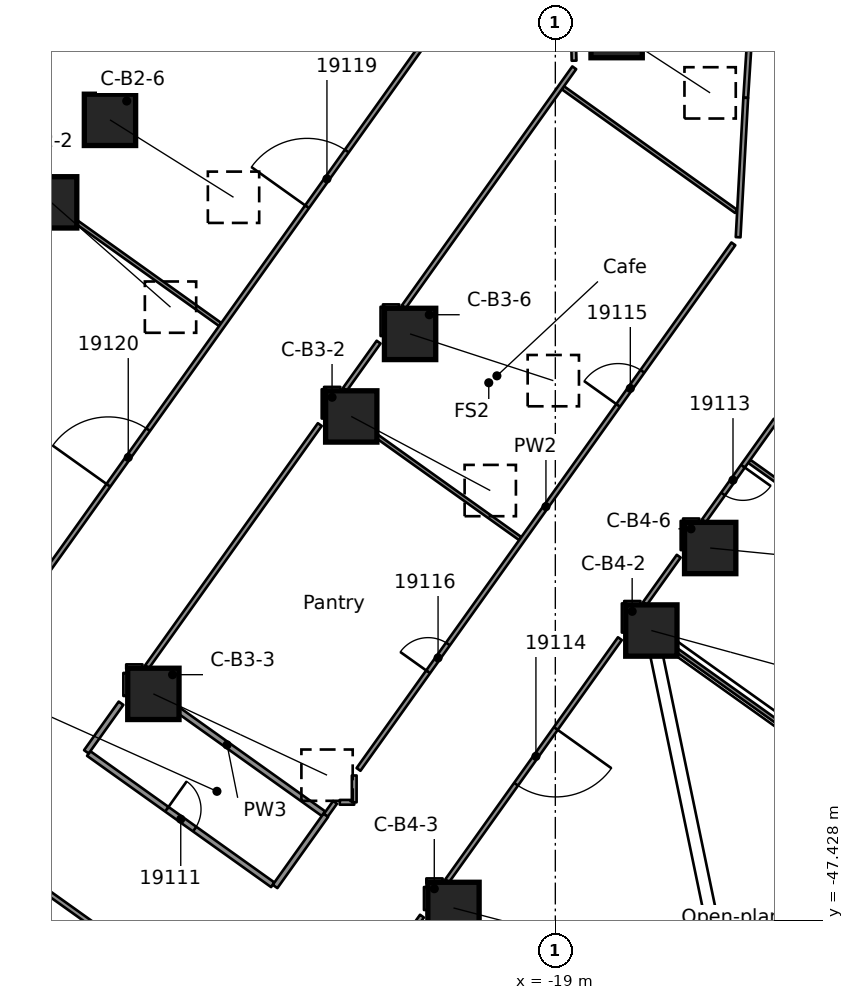
"""IFC4 building model, lengths in metres.
Left out: names, types, materials, properties, quantities, classifications, styles, units other than length and angle.
Written with IfcOpenShell. Run it as: python <this file> out.ifc"""

import sys

from ifc_helpers import new_model, si_unit, direction, frame, frame_2d, origin, origin_2d, place, context, subcontext, project, spatial, rectangle, extrude, element, fill, save


model = new_model("IFC4")
c1 = context("Model", 3, precision=1e-05, world=origin(), true_north=direction((0.0, 1.0)))
c2 = subcontext(c1, "Body", "Model", "MODEL_VIEW")
j1 = project(units=[si_unit("LENGTHUNIT", "METRE"), si_unit("PLANEANGLEUNIT", "RADIAN")], contexts=[c1])
p1 = place(None, origin())
s1 = spatial("IfcSite", under=j1, at=p1, CompositionType="ELEMENT")
p2 = place(p1, origin())
s2 = spatial("IfcBuilding", under=s1, at=p2, CompositionType="ELEMENT")
p3 = place(p2, frame((0.0, 0.0, 98.2)))
s3 = spatial("IfcBuildingStorey", under=s2, at=p3, CompositionType="ELEMENT", Elevation=98.2)
p4 = place(p3, frame((-32.267, -28.533, 0.555), z_axis=(0.618188651788, -0.542608770763, 0.568698964912), x_axis=(0.659670030756, 0.751555354264, 0.0)))
e1 = element("IfcColumn", 1, at=p4, inside=s3, PredefinedType="COLUMN", context=c2, shape_type="SweptSolid", body=[
    extrude(rectangle(XDim=1.35, YDim=1.35, at=origin_2d()), origin(), (0.0, 0.0, 1.0), 5.081),
])
p5 = place(p3, frame((-30.719, -26.362, 0.537), z_axis=(0.673755446544, -0.422134401511, 0.606511455221), x_axis=(0.530936748584, 0.847411452013, 0.0)))
e2 = element("IfcColumn", 2, at=p5, inside=s3, PredefinedType="COLUMN", context=c2, shape_type="SweptSolid", body=[
    extrude(rectangle(XDim=1.35, YDim=1.35, at=origin_2d()), origin(), (0.0, 0.0, 1.0), 4.825),
])
p6 = place(p3, frame((-24.37, -34.166, 0.553), z_axis=(0.723657942308, -0.38573518321, 0.572300228), x_axis=(0.470383419511, 0.882462145731, 0.0)))
e3 = element("IfcColumn", 3, at=p6, inside=s3, PredefinedType="COLUMN", context=c2, shape_type="SweptSolid", body=[
    extrude(rectangle(XDim=1.35, YDim=1.35, at=origin_2d()), origin(), (0.0, 0.0, 1.0), 5.055),
])
p7 = place(p3, frame((-29.577, -41.466, 0.589), z_axis=(0.790481731796, -0.369986668034, 0.488107055033), x_axis=(0.423915616094, 0.905701689538, 0.0)))
e4 = element("IfcColumn", 4, at=p7, inside=s3, PredefinedType="COLUMN", context=c2, shape_type="SweptSolid", body=[
    extrude(rectangle(XDim=1.35, YDim=1.35, at=origin_2d()), origin(), (0.0, 0.0, 1.0), 5.781),
])
p8 = place(p3, frame((-22.822, -31.995, 0.544), z_axis=(0.76622208447, -0.249848553778, 0.592013021347), x_axis=(0.310013339183, 0.950732207053, 0.0)))
e5 = element("IfcColumn", 5, at=p8, inside=s3, PredefinedType="COLUMN", context=c2, shape_type="SweptSolid", body=[
    extrude(rectangle(XDim=1.35, YDim=1.35, at=origin_2d()), origin(), (0.0, 0.0, 1.0), 4.919),
])
p9 = place(p3, frame((-16.473, -39.799, 0.562), z_axis=(0.803489718201, -0.21971009191, 0.553291738831), x_axis=(0.263761556788, 0.964587912614, 0.0)))
e6 = element("IfcColumn", 6, at=p9, inside=s3, PredefinedType="COLUMN", context=c2, shape_type="SweptSolid", body=[
    extrude(rectangle(XDim=1.35, YDim=1.35, at=origin_2d()), origin(), (0.0, 0.0, 1.0), 5.197),
])
p10 = place(p3, frame((-21.68, -47.098, 0.595), z_axis=(0.853278071018, -0.223555579067, 0.471104485851), x_axis=(0.253442130639, 0.967350549913, 0.0)))
e7 = element("IfcColumn", 7, at=p10, inside=s3, PredefinedType="COLUMN", context=c2, shape_type="SweptSolid", body=[
    extrude(rectangle(XDim=1.35, YDim=1.35, at=origin_2d()), origin(), (0.0, 0.0, 1.0), 5.963),
])
p11 = place(p3, frame((-14.925, -37.628, 0.561), z_axis=(0.827494463111, -0.081495666822, 0.555528009924), x_axis=(0.098010679686, 0.995185362969, 0.0)))
e8 = element("IfcColumn", 8, at=p11, inside=s3, PredefinedType="COLUMN", context=c2, shape_type="SweptSolid", body=[
    extrude(rectangle(XDim=1.35, YDim=1.35, at=origin_2d()), origin(), (0.0, 0.0, 1.0), 5.18),
])
p12 = place(p3, frame((-17.387, -24.053, 0.467), z_axis=(0.57958595143, -0.376765381289, 0.722584232023), x_axis=(0.54502344735, 0.838420802366, 0.0)))
e9 = element("IfcColumn", 9, at=p12, inside=s3, PredefinedType="COLUMN", context=c2, shape_type="SweptSolid", body=[
    extrude(rectangle(XDim=1.35, YDim=1.35, at=origin_2d()), origin(), (0.0, 0.0, 1.0), 4.244),
])
p13 = place(p3, frame((-18.681, -18.114, 0.0), z_axis=(0.0, 0.0, 1.0), x_axis=(0.025970949463, -0.999662698006, 0.0)))
e10 = element("IfcWall", 10, at=p13, inside=s3, PredefinedType="PARTITIONING", context=c2, shape_type="SweptSolid", body=[
    extrude(rectangle(XDim=6.693, YDim=0.125, at=frame_2d((3.347, 0.0))), origin(), (0.0, 0.0, 1.0), 3.58),
])
p14 = place(p3, frame((-25.586, -51.52, 0.0), z_axis=(0.0, 0.0, 1.0), x_axis=(-0.814070118749, 0.580766598351, 0.0)))
e11 = element("IfcWall", 11, at=p14, inside=s3, PredefinedType="PARTITIONING", context=c2, shape_type="SweptSolid", body=[
    extrude(rectangle(XDim=13.176, YDim=0.125, at=frame_2d((6.588, 0.0))), origin(), (0.0, 0.0, 1.0), 3.58),
])
p15 = place(p14, frame((8.938, 0.0, 0.0)))
e12 = element("IfcOpeningElement", 12, at=p15, cuts=e11, PredefinedType="OPENING", context=c2, shape_type="SweptSolid", body=[
    extrude(rectangle(XDim=1.8, YDim=2.1, at=frame_2d((0.9, 1.05))), frame((0.0, 0.073, 0.0), z_axis=(0.0, -1.0, 0.0), x_axis=(1.0, 0.0, 0.0)), (0.0, 0.0, 1.0), 0.145),
])
p16 = place(p3, frame((-31.279, -43.035, 0.0), z_axis=(0.0, 0.0, 1.0), x_axis=(0.814146456828, -0.58065957913, 0.0)))
e13 = element("IfcWall", 13, at=p16, inside=s3, PredefinedType="PARTITIONING", context=c2, shape_type="SweptSolid", body=[
    extrude(rectangle(XDim=5.948, YDim=0.15, at=frame_2d((2.974, 0.0))), origin(), (0.0, 0.0, 1.0), 3.58),
])
p17 = place(p16, frame((2.525, 0.0, 0.0)))
e14 = element("IfcOpeningElement", 14, at=p17, cuts=e13, PredefinedType="OPENING", context=c2, shape_type="SweptSolid", body=[
    extrude(rectangle(XDim=0.9, YDim=2.1, at=frame_2d((0.45, 1.05))), frame((0.0, 0.085, 0.0), z_axis=(0.0, -1.0, 0.0), x_axis=(1.0, 0.0, 0.0)), (0.0, 0.0, 1.0), 0.17),
])
p18 = place(p3, frame((-30.173, -41.0, 0.0), z_axis=(0.0, 0.0, 1.0), x_axis=(0.81418338872, -0.580607793207, 0.0)))
e15 = element("IfcWall", 15, at=p18, inside=s3, PredefinedType="PARTITIONING", context=c2, shape_type="SweptSolid", body=[
    extrude(rectangle(XDim=6.229, YDim=0.15, at=frame_2d((3.115, 0.0))), origin(), (0.0, 0.0, 1.0), 3.58),
])
p19 = place(p3, frame((-22.302, -46.613, 0.0), z_axis=(0.0, 0.0, 1.0), x_axis=(0.814113642146, -0.580705586052, 0.0)))
e16 = element("IfcWall", 16, at=p19, inside=s3, PredefinedType="PARTITIONING", context=c2, shape_type="SweptSolid", body=[
    extrude(rectangle(XDim=15.874, YDim=0.1, at=frame_2d((7.937, 0.0))), origin(), (0.0, 0.0, 1.0), 3.58),
])
p20 = place(p3, frame((-40.875, -22.433, 0.0), z_axis=(0.0, 0.0, 1.0), x_axis=(0.814077901833, -0.580755688519, 0.0)))
e17 = element("IfcWall", 17, at=p20, inside=s3, PredefinedType="PARTITIONING", context=c2, shape_type="SweptSolid", body=[
    extrude(rectangle(XDim=16.038, YDim=0.1, at=frame_2d((8.019, 0.0))), origin(), (0.0, 0.0, 1.0), 3.58),
])
p21 = place(p3, frame((-24.993, -33.762, 0.0), z_axis=(0.0, 0.0, 1.0), x_axis=(0.813990298992, -0.580878466761, 0.0)))
e18 = element("IfcWall", 18, at=p21, inside=s3, PredefinedType="PARTITIONING", context=c2, shape_type="SweptSolid", body=[
    extrude(rectangle(XDim=6.228, YDim=0.1, at=frame_2d((3.114, 0.0))), origin(), (0.0, 0.0, 1.0), 3.58),
])
p22 = place(p3, frame((-17.095, -39.395, 0.0), z_axis=(0.0, 0.0, 1.0), x_axis=(0.814054615278, -0.580788329209, 0.0)))
e19 = element("IfcWall", 19, at=p22, inside=s3, PredefinedType="PARTITIONING", context=c2, shape_type="SweptSolid", body=[
    extrude(rectangle(XDim=15.558, YDim=0.1, at=frame_2d((7.779, 0.0))), origin(), (0.0, 0.0, 1.0), 3.58),
])
p23 = place(p3, frame((-13.896, -35.347, 0.0), z_axis=(0.0, 0.0, 1.0), x_axis=(0.814118018686, -0.580699450362, 0.0)))
e20 = element("IfcWall", 20, at=p23, inside=s3, PredefinedType="PARTITIONING", context=c2, shape_type="SweptSolid", body=[
    extrude(rectangle(XDim=14.793, YDim=0.1, at=frame_2d((7.396, 0.0))), origin(), (0.0, 0.0, 1.0), 3.58),
])
p24 = place(p3, frame((-18.801, -25.518, 0.0), z_axis=(0.0, 0.0, 1.0), x_axis=(0.814033792671, -0.580817513845, 0.0)))
e21 = element("IfcWall", 21, at=p24, inside=s3, PredefinedType="PARTITIONING", context=c2, shape_type="SweptSolid", body=[
    extrude(rectangle(XDim=5.601, YDim=0.1, at=frame_2d((2.8, 0.0))), origin(), (0.0, 0.0, 1.0), 3.58),
])
p25 = place(p3, frame((-22.394, -46.384, 0.0), z_axis=(0.0, 0.0, 1.0), x_axis=(1.0, 0.0, 0.0)))
e22 = element("IfcWall", 22, at=p25, inside=s3, PredefinedType="PARTITIONING", context=c2, shape_type="SweptSolid", body=[
    extrude(rectangle(XDim=0.428, YDim=0.125, at=frame_2d((0.214, 0.0))), origin(), (0.0, 0.0, 1.0), 3.58),
])
p26 = place(p3, frame((-24.674, -44.319, 0.0), z_axis=(0.0, 0.0, 1.0), x_axis=(1.0, 0.0, 0.0)))
e23 = element("IfcWall", 23, at=p26, inside=s3, PredefinedType="PARTITIONING", context=c2, shape_type="SweptSolid", body=[
    extrude(rectangle(XDim=0.382, YDim=0.125, at=frame_2d((0.191, 0.0))), origin(), (0.0, 0.0, 1.0), 3.58),
])
p27 = place(p3, frame((-30.292, -40.752, 0.0), z_axis=(0.0, 0.0, 1.0), x_axis=(1.0, 0.0, 0.0)))
e24 = element("IfcWall", 24, at=p27, inside=s3, PredefinedType="PARTITIONING", context=c2, shape_type="SweptSolid", body=[
    extrude(rectangle(XDim=0.428, YDim=0.125, at=frame_2d((0.214, 0.0))), origin(), (0.0, 0.0, 1.0), 3.58),
])
for number, where, z_axis, x_axis in (
    (25, (-17.187, -39.085, 0.0), (0.0, 0.0, 1.0), (1.0, 0.0, 0.0)),
    (26, (-15.639, -36.914, 0.0), (0.0, 0.0, 1.0), (1.0, 0.0, 0.0)),
):
    element("IfcWall", number, at=place(p3, frame(where, z_axis=z_axis, x_axis=x_axis)), inside=s3, PredefinedType="PARTITIONING", context=c2, shape_type="SweptSolid", body=[
        extrude(rectangle(XDim=0.427, YDim=0.125, at=frame_2d((0.213, 0.0))), origin(), (0.0, 0.0, 1.0), 3.58),
    ])
for number, where, z_axis, x_axis in (
    (27, (-25.085, -33.451, 0.0), (0.0, 0.0, 1.0), (1.0, 0.0, 0.0)),
    (28, (-23.536, -31.28, 0.0), (0.0, 0.0, 1.0), (1.0, 0.0, 0.0)),
):
    element("IfcWall", number, at=place(p3, frame(where, z_axis=z_axis, x_axis=x_axis)), inside=s3, PredefinedType="PARTITIONING", context=c2, shape_type="SweptSolid", body=[
        extrude(rectangle(XDim=0.428, YDim=0.125, at=frame_2d((0.214, 0.0))), origin(), (0.0, 0.0, 1.0), 3.58),
    ])
p28 = place(p3, frame((-25.04, -44.661, 0.0), z_axis=(0.0, 0.0, 1.0), x_axis=(0.582339384151, 0.812945780275, 0.0)))
e29 = element("IfcWall", 29, at=p28, inside=s3, PredefinedType="PARTITIONING", context=c2, shape_type="SweptSolid", body=[
    extrude(rectangle(XDim=0.419, YDim=0.125, at=frame_2d((0.209, 0.0))), origin(), (0.0, 0.0, 1.0), 3.58),
])
p29 = place(p3, frame((-22.509, -47.314, 0.0), z_axis=(0.0, 0.0, 1.0), x_axis=(-0.580683886647, -0.81412911985, 0.0)))
e30 = element("IfcWall", 30, at=p29, inside=s3, PredefinedType="PARTITIONING", context=c2, shape_type="SweptSolid", body=[
    extrude(rectangle(XDim=5.209, YDim=0.125, at=frame_2d((2.604, 0.0))), origin(), (0.0, 0.0, 1.0), 3.58),
])
p30 = place(p29, frame((2.46, 0.0, 0.0)))
e31 = element("IfcOpeningElement", 31, at=p30, cuts=e30, PredefinedType="OPENING", context=c2, shape_type="SweptSolid", body=[
    extrude(rectangle(XDim=1.8, YDim=2.1, at=frame_2d((0.9, 1.05))), frame((0.0, 0.073, 0.0), z_axis=(0.0, -1.0, 0.0), x_axis=(1.0, 0.0, 0.0)), (0.0, 0.0, 1.0), 0.145),
])
p31 = place(p3, frame((-17.301, -40.013, 0.0), z_axis=(0.0, 0.0, 1.0), x_axis=(-0.58071861579, -0.814104347904, 0.0)))
e32 = element("IfcWall", 32, at=p31, inside=s3, PredefinedType="PARTITIONING", context=c2, shape_type="SweptSolid", body=[
    extrude(rectangle(XDim=7.825, YDim=0.125, at=frame_2d((3.912, 0.0))), origin(), (0.0, 0.0, 1.0), 3.58),
])
p32 = place(p31, frame((2.905, 0.0, 0.0)))
e33 = element("IfcOpeningElement", 33, at=p32, cuts=e32, PredefinedType="OPENING", context=c2, shape_type="SweptSolid", body=[
    extrude(rectangle(XDim=1.8, YDim=2.1, at=frame_2d((0.9, 1.05))), frame((0.0, 0.073, 0.0), z_axis=(0.0, -1.0, 0.0), x_axis=(1.0, 0.0, 0.0)), (0.0, 0.0, 1.0), 0.145),
])
p33 = place(p3, frame((-16.639, -39.084, 0.0), z_axis=(0.0, 0.0, 1.0), x_axis=(0.581056427343, 0.813863273679, 0.0)))
e34 = element("IfcWall", 34, at=p33, inside=s3, PredefinedType="PARTITIONING", context=c2, shape_type="SweptSolid", body=[
    extrude(rectangle(XDim=1.525, YDim=0.125, at=frame_2d((0.762, 0.0))), origin(), (0.0, 0.0, 1.0), 3.58),
])
p34 = place(p3, frame((-13.2, -34.264, 0.0), z_axis=(0.0, 0.0, 1.0), x_axis=(-0.580805225512, -0.814042560324, 0.0)))
e35 = element("IfcWall", 35, at=p34, inside=s3, PredefinedType="PARTITIONING", context=c2, shape_type="SweptSolid", body=[
    extrude(rectangle(XDim=3.254, YDim=0.125, at=frame_2d((1.627, 0.0))), origin(), (0.0, 0.0, 1.0), 3.58),
])
p35 = place(p34, frame((1.487, 0.0, 0.0)))
e36 = element("IfcOpeningElement", 36, at=p35, cuts=e35, PredefinedType="OPENING", context=c2, shape_type="SweptSolid", body=[
    extrude(rectangle(XDim=0.9, YDim=2.1, at=frame_2d((0.45, 1.05))), frame((0.0, 0.073, 0.0), z_axis=(0.0, -1.0, 0.0), x_axis=(1.0, 0.0, 0.0)), (0.0, 0.0, 1.0), 0.145),
])
p36 = place(p3, frame((-26.375, -46.533, 0.0), z_axis=(0.0, 0.0, 1.0), x_axis=(0.580595189634, 0.814192376392, 0.0)))
e37 = element("IfcWall", 37, at=p36, inside=s3, PredefinedType="PARTITIONING", context=c2, shape_type="SweptSolid", body=[
    extrude(rectangle(XDim=2.299, YDim=0.15, at=frame_2d((1.15, 0.0))), origin(), (0.0, 0.0, 1.0), 3.58),
])
p37 = place(p3, frame((-24.179, -43.454, 0.0), z_axis=(0.0, 0.0, 1.0), x_axis=(0.580695596551, 0.814120767544, 0.0)))
e38 = element("IfcWall", 38, at=p37, inside=s3, PredefinedType="PARTITIONING", context=c2, shape_type="SweptSolid", body=[
    extrude(rectangle(XDim=16.987, YDim=0.125, at=frame_2d((8.493, 0.0))), origin(), (0.0, 0.0, 1.0), 3.58),
])
p38 = place(p37, frame((11.767, 0.0, 0.0)))
e39 = element("IfcOpeningElement", 39, at=p38, cuts=e38, PredefinedType="OPENING", context=c2, shape_type="SweptSolid", body=[
    extrude(rectangle(XDim=1.1, YDim=2.1, at=frame_2d((0.55, 1.05))), frame((0.0, 0.073, 0.0), z_axis=(0.0, -1.0, 0.0), x_axis=(1.0, 0.0, 0.0)), (0.0, 0.0, 1.0), 0.145),
])
p39 = place(p37, frame((3.155, 0.0, 0.0)))
e40 = element("IfcOpeningElement", 40, at=p39, cuts=e38, PredefinedType="OPENING", context=c2, shape_type="SweptSolid", body=[
    extrude(rectangle(XDim=0.9, YDim=2.1, at=frame_2d((0.45, 1.05))), frame((0.0, 0.073, 0.0), z_axis=(0.0, -1.0, 0.0), x_axis=(1.0, 0.0, 0.0)), (0.0, 0.0, 1.0), 0.145),
])
p40 = place(p3, frame((-18.502, -24.992, 0.0), z_axis=(0.0, 0.0, 1.0), x_axis=(-0.580690883061, -0.814124129559, 0.0)))
e41 = element("IfcWall", 41, at=p40, inside=s3, PredefinedType="PARTITIONING", context=c2, shape_type="SweptSolid", body=[
    extrude(rectangle(XDim=7.724, YDim=0.125, at=frame_2d((3.862, 0.0))), origin(), (0.0, 0.0, 1.0), 3.58),
])
p41 = place(p3, frame((-31.34, -42.991, 0.0), z_axis=(0.0, 0.0, 1.0), x_axis=(0.580605884061, 0.81418475016, 0.0)))
e42 = element("IfcWall", 42, at=p41, inside=s3, PredefinedType="PARTITIONING", context=c2, shape_type="SweptSolid", body=[
    extrude(rectangle(XDim=1.571, YDim=0.15, at=frame_2d((0.786, 0.0))), origin(), (0.0, 0.0, 1.0), 3.58),
])
p42 = place(p3, frame((-29.743, -40.751, 0.0), z_axis=(0.0, 0.0, 1.0), x_axis=(0.580742324447, 0.814087435473, 0.0)))
e43 = element("IfcWall", 43, at=p42, inside=s3, PredefinedType="PARTITIONING", context=c2, shape_type="SweptSolid", body=[
    extrude(rectangle(XDim=7.826, YDim=0.125, at=frame_2d((3.913, 0.0))), origin(), (0.0, 0.0, 1.0), 3.58),
])
p43 = place(p3, frame((-24.536, -33.451, 0.0), z_axis=(0.0, 0.0, 1.0), x_axis=(0.581056427343, 0.813863273679, 0.0)))
e44 = element("IfcWall", 44, at=p43, inside=s3, PredefinedType="PARTITIONING", context=c2, shape_type="SweptSolid", body=[
    extrude(rectangle(XDim=1.525, YDim=0.125, at=frame_2d((0.762, 0.0))), origin(), (0.0, 0.0, 1.0), 3.58),
])
p44 = place(p3, frame((-32.593, -38.546, 0.0), z_axis=(0.0, 0.0, 1.0), x_axis=(0.580752168923, 0.814080412669, 0.0)))
e45 = element("IfcWall", 45, at=p44, inside=s3, PredefinedType="PARTITIONING", context=c2, shape_type="SweptSolid", body=[
    extrude(rectangle(XDim=18.013, YDim=0.125, at=frame_2d((9.006, 0.0))), origin(), (0.0, 0.0, 1.0), 3.58),
])
p45 = place(p44, frame((12.158, 0.0, 0.0)))
e46 = element("IfcOpeningElement", 46, at=p45, cuts=e45, PredefinedType="OPENING", context=c2, shape_type="SweptSolid", body=[
    extrude(rectangle(XDim=1.8, YDim=2.1, at=frame_2d((0.9, 1.05))), frame((0.0, 0.073, 0.0), z_axis=(0.0, -1.0, 0.0), x_axis=(1.0, 0.0, 0.0)), (0.0, 0.0, 1.0), 0.145),
])
p46 = place(p44, frame((3.155, 0.0, 0.0)))
e47 = element("IfcOpeningElement", 47, at=p46, cuts=e45, PredefinedType="OPENING", context=c2, shape_type="SweptSolid", body=[
    extrude(rectangle(XDim=1.8, YDim=2.1, at=frame_2d((0.9, 1.05))), frame((0.0, 0.073, 0.0), z_axis=(0.0, -1.0, 0.0), x_axis=(1.0, 0.0, 0.0)), (0.0, 0.0, 1.0), 0.145),
])
p47 = place(p3, frame((-13.99, -25.782, 0.0), z_axis=(0.0, 0.0, 1.0), x_axis=(0.0642946406, 0.99793095913, 0.0)))
e48 = element("IfcWall", 48, at=p47, inside=s3, PredefinedType="PARTITIONING", context=c2, shape_type="SweptSolid", body=[
    extrude(rectangle(XDim=7.249, YDim=0.125, at=frame_2d((3.625, 0.0))), origin(), (0.0, 0.0, 1.0), 3.58),
])
p48 = place(p47, frame((3.35, 0.0, 0.0)))
e49 = element("IfcOpeningElement", 49, at=p48, cuts=e48, PredefinedType="OPENING", context=c2, shape_type="SweptSolid", body=[
    extrude(rectangle(XDim=1.0, YDim=2.1, at=frame_2d((0.5, 1.05))), frame((0.0, 0.073, 0.0), z_axis=(0.0, -1.0, 0.0), x_axis=(1.0, 0.0, 0.0)), (0.0, 0.0, 1.0), 0.145),
])
p49 = place(p3, frame((-14.19, -29.45, 0.0), z_axis=(0.0, 0.0, 1.0), x_axis=(0.054431963362, 0.998517481752, 0.0)))
e50 = element("IfcWall", 50, at=p49, inside=s3, PredefinedType="PARTITIONING", context=c2, shape_type="SweptSolid", body=[
    extrude(rectangle(XDim=3.673, YDim=0.125, at=frame_2d((1.837, 0.0))), origin(), (0.0, 0.0, 1.0), 3.58),
])
p50 = place(p3, frame((-15.639, -37.683, 0.0), z_axis=(0.0, 0.0, 1.0), x_axis=(0.0, 1.0, 0.0)))
e51 = element("IfcWall", 51, at=p50, inside=s3, PredefinedType="PARTITIONING", context=c2, shape_type="SweptSolid", body=[
    extrude(rectangle(XDim=0.769, YDim=0.125, at=frame_2d((0.385, 0.0))), origin(), (0.0, 0.0, 1.0), 3.58),
])
p51 = place(p3, frame((-17.187, -39.853, 0.0), z_axis=(0.0, 0.0, 1.0), x_axis=(0.0, 1.0, 0.0)))
e52 = element("IfcWall", 52, at=p51, inside=s3, PredefinedType="PARTITIONING", context=c2, shape_type="SweptSolid", body=[
    extrude(rectangle(XDim=0.768, YDim=0.125, at=frame_2d((0.384, 0.0))), origin(), (0.0, 0.0, 1.0), 3.58),
])
p52 = place(p3, frame((-22.394, -47.153, 0.0), z_axis=(0.0, 0.0, 1.0), x_axis=(0.0, 1.0, 0.0)))
e53 = element("IfcWall", 53, at=p52, inside=s3, PredefinedType="PARTITIONING", context=c2, shape_type="SweptSolid", body=[
    extrude(rectangle(XDim=0.605, YDim=0.125, at=frame_2d((0.302, 0.0))), origin(), (0.0, 0.0, 1.0), 3.58),
])
p53 = place(p3, frame((-23.536, -32.05, 0.0), z_axis=(0.0, 0.0, 1.0), x_axis=(0.0, 1.0, 0.0)))
e54 = element("IfcWall", 54, at=p53, inside=s3, PredefinedType="PARTITIONING", context=c2, shape_type="SweptSolid", body=[
    extrude(rectangle(XDim=0.77, YDim=0.125, at=frame_2d((0.385, 0.0))), origin(), (0.0, 0.0, 1.0), 3.58),
])
p54 = place(p3, frame((-24.292, -44.319, 0.0), z_axis=(0.0, 0.0, 1.0), x_axis=(0.0, 1.0, 0.0)))
e55 = element("IfcWall", 55, at=p54, inside=s3, PredefinedType="PARTITIONING", context=c2, shape_type="SweptSolid", body=[
    extrude(rectangle(XDim=0.706, YDim=0.125, at=frame_2d((0.353, 0.0))), origin(), (0.0, 0.0, 1.0), 3.58),
])
p55 = place(p3, frame((-25.085, -34.221, 0.0), z_axis=(0.0, 0.0, 1.0), x_axis=(0.0, 1.0, 0.0)))
e56 = element("IfcWall", 56, at=p55, inside=s3, PredefinedType="PARTITIONING", context=c2, shape_type="SweptSolid", body=[
    extrude(rectangle(XDim=0.77, YDim=0.125, at=frame_2d((0.385, 0.0))), origin(), (0.0, 0.0, 1.0), 3.58),
])
p56 = place(p3, frame((-30.292, -41.521, 0.0), z_axis=(0.0, 0.0, 1.0), x_axis=(0.0, 1.0, 0.0)))
e57 = element("IfcWall", 57, at=p56, inside=s3, PredefinedType="PARTITIONING", context=c2, shape_type="SweptSolid", body=[
    extrude(rectangle(XDim=0.606, YDim=0.15, at=frame_2d((0.303, 0.0))), origin(), (0.0, 0.0, 1.0), 3.58),
])
p57 = place(p17, origin())
e58 = element("IfcDoor", 58, at=p57, inside=s3, OperationType="SINGLE_SWING_RIGHT", PredefinedType="DOOR", context=c2, shape_type="SweptSolid", body=[
    extrude(rectangle(XDim=0.9, YDim=2.1, at=frame_2d((0.45, 1.05))), frame((0.0, 0.025, 0.0), z_axis=(0.0, -1.0, 0.0), x_axis=(1.0, 0.0, 0.0)), (0.0, 0.0, 1.0), 0.05),
])
fill(e14, e58)
p58 = place(p35, origin())
e59 = element("IfcDoor", 59, at=p58, inside=s3, OperationType="SINGLE_SWING_RIGHT", PredefinedType="DOOR", context=c2, shape_type="SweptSolid", body=[
    extrude(rectangle(XDim=0.9, YDim=2.1, at=frame_2d((0.45, 1.05))), frame((0.0, 0.025, 0.0), z_axis=(0.0, -1.0, 0.0), x_axis=(1.0, 0.0, 0.0)), (0.0, 0.0, 1.0), 0.05),
])
fill(e36, e59)
p59 = place(p32, origin())
e60 = element("IfcDoor", 60, at=p59, inside=s3, OperationType="DOUBLE_DOOR_SINGLE_SWING", PredefinedType="DOOR", context=c2, shape_type="SweptSolid", body=[
    extrude(rectangle(XDim=1.8, YDim=2.1, at=frame_2d((0.9, 1.05))), frame((0.0, 0.025, 0.0), z_axis=(0.0, -1.0, 0.0), x_axis=(1.0, 0.0, 0.0)), (0.0, 0.0, 1.0), 0.05),
])
fill(e33, e60)
p60 = place(p38, origin())
e61 = element("IfcDoor", 61, at=p60, inside=s3, OperationType="SINGLE_SWING_RIGHT", PredefinedType="DOOR", context=c2, shape_type="SweptSolid", body=[
    extrude(rectangle(XDim=1.1, YDim=2.1, at=frame_2d((0.55, 1.05))), frame((0.0, 0.025, 0.0), z_axis=(0.0, -1.0, 0.0), x_axis=(1.0, 0.0, 0.0)), (0.0, 0.0, 1.0), 0.05),
])
fill(e39, e61)
p61 = place(p39, origin())
e62 = element("IfcDoor", 62, at=p61, inside=s3, OperationType="SINGLE_SWING_LEFT", PredefinedType="DOOR", context=c2, shape_type="SweptSolid", body=[
    extrude(rectangle(XDim=0.9, YDim=2.1, at=frame_2d((0.45, 1.05))), frame((0.0, 0.025, 0.0), z_axis=(0.0, -1.0, 0.0), x_axis=(1.0, 0.0, 0.0)), (0.0, 0.0, 1.0), 0.05),
])
fill(e40, e62)
p62 = place(p45, origin())
e63 = element("IfcDoor", 63, at=p62, inside=s3, OperationType="DOUBLE_DOOR_SINGLE_SWING", PredefinedType="DOOR", context=c2, shape_type="SweptSolid", body=[
    extrude(rectangle(XDim=1.8, YDim=2.1, at=frame_2d((0.9, 1.05))), frame((0.0, 0.025, 0.0), z_axis=(0.0, -1.0, 0.0), x_axis=(1.0, 0.0, 0.0)), (0.0, 0.0, 1.0), 0.05),
])
fill(e46, e63)
p63 = place(p46, origin())
e64 = element("IfcDoor", 64, at=p63, inside=s3, OperationType="DOUBLE_DOOR_SINGLE_SWING", PredefinedType="DOOR", context=c2, shape_type="SweptSolid", body=[
    extrude(rectangle(XDim=1.8, YDim=2.1, at=frame_2d((0.9, 1.05))), frame((0.0, 0.025, 0.0), z_axis=(0.0, -1.0, 0.0), x_axis=(1.0, 0.0, 0.0)), (0.0, 0.0, 1.0), 0.05),
])
fill(e47, e64)
save(model, sys.argv[1])
